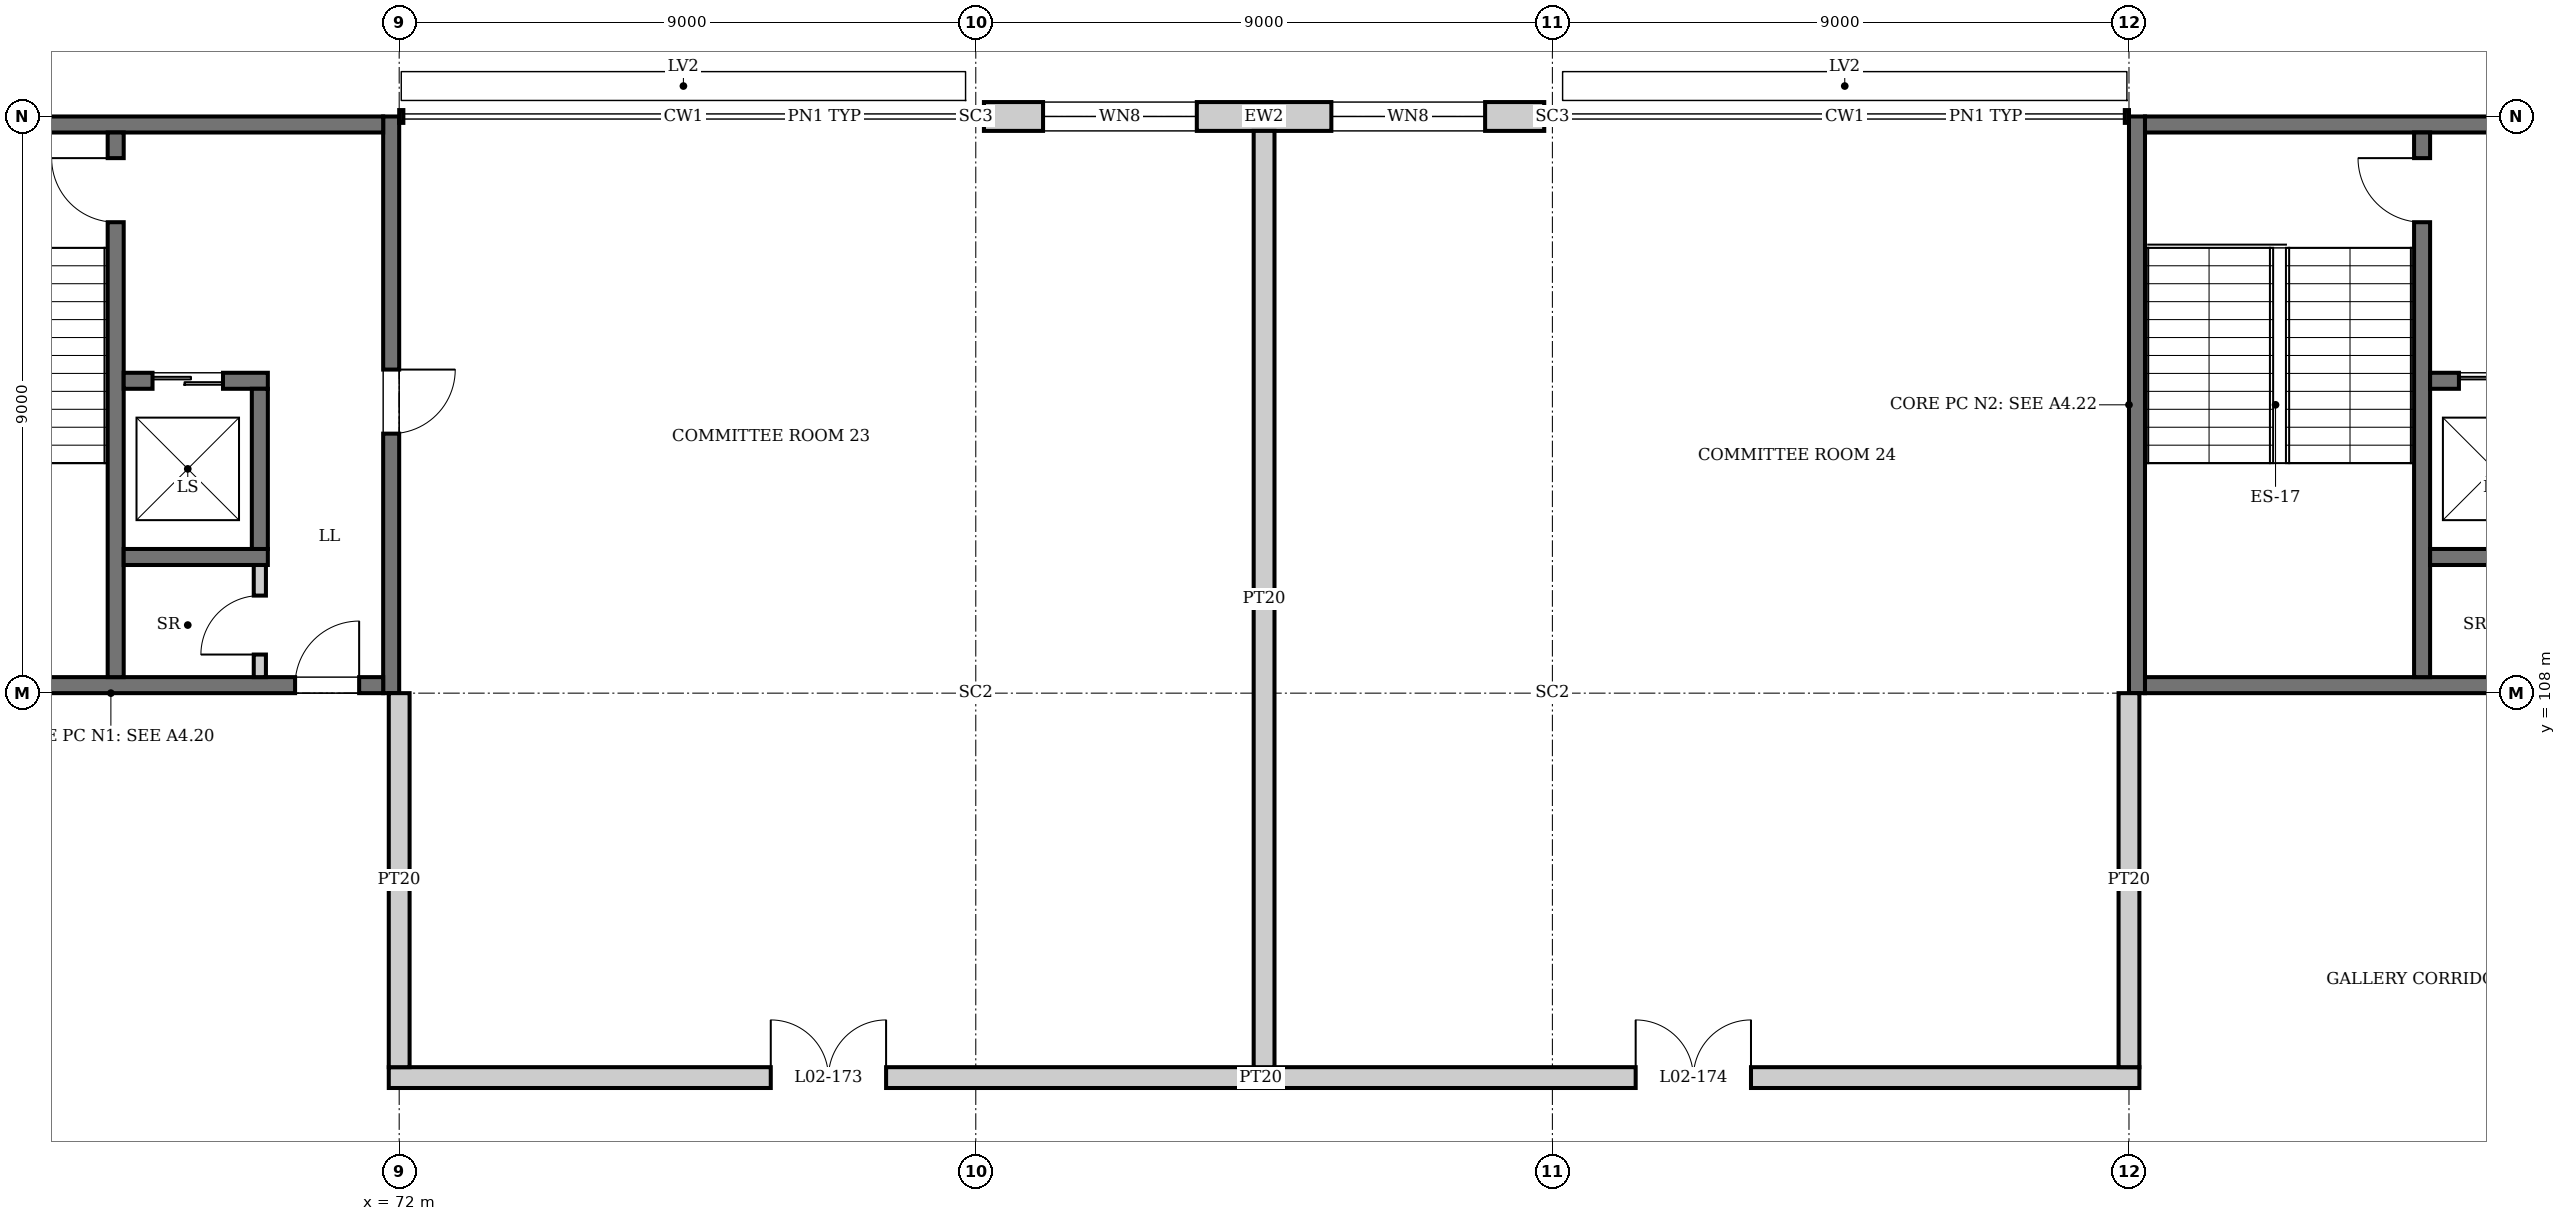
"""IFC4 building model, lengths in metres.
Left out: names, types, materials, properties, quantities, classifications, styles, units other than length and angle.
Written with IfcOpenShell. Run it as: python <this file> out.ifc"""

import sys

from ifc_helpers import new_model, si_unit, direction, frame, frame_2d, origin, origin_2d, place, context, subcontext, project, spatial, rectangle, i_section, extrude, element, fill, save


model = new_model("IFC4")
c1 = context("Model", 3, precision=1e-05, world=origin(), true_north=direction((0.0, 1.0)))
c2 = subcontext(c1, "Body", "Model", "MODEL_VIEW")
j1 = project(units=[si_unit("LENGTHUNIT", "METRE"), si_unit("PLANEANGLEUNIT", "RADIAN")], contexts=[c1])
p1 = place(None, origin())
s1 = spatial("IfcSite", under=j1, at=p1, CompositionType="ELEMENT")
p2 = place(p1, origin())
s2 = spatial("IfcBuilding", under=s1, at=p2, CompositionType="ELEMENT")
p3 = place(p2, frame((0.0, 0.0, 10.5)))
s3 = spatial("IfcBuildingStorey", under=s2, at=p3, CompositionType="ELEMENT", Elevation=10.5)
p4 = place(p3, frame((81.0, 108.0, 0.0), z_axis=(0.0, 0.0, 1.0), x_axis=(0.0, 1.0, 0.0)))
e1 = element("IfcColumn", 1, at=p4, inside=s3, PredefinedType="COLUMN", context=c2, shape_type="SweptSolid", body=[
    extrude(i_section(OverallWidth=0.256, OverallDepth=0.26, WebThickness=0.01, FlangeThickness=0.017, at=origin_2d()), origin(), (0.0, 0.0, 1.0), 4.5),
])
p5 = place(p3, frame((81.0, 117.0, 0.0), z_axis=(0.0, 0.0, 1.0), x_axis=(0.0, 1.0, 0.0)))
e2 = element("IfcColumn", 2, at=p5, inside=s3, PredefinedType="COLUMN", context=c2, shape_type="SweptSolid", body=[
    extrude(i_section(OverallWidth=0.254, OverallDepth=0.254, WebThickness=0.009, FlangeThickness=0.014, at=origin_2d()), origin(), (0.0, 0.0, 1.0), 4.5),
])
p6 = place(p3, frame((90.0, 108.0, 0.0), z_axis=(0.0, 0.0, 1.0), x_axis=(0.0, 1.0, 0.0)))
e3 = element("IfcColumn", 3, at=p6, inside=s3, PredefinedType="COLUMN", context=c2, shape_type="SweptSolid", body=[
    extrude(i_section(OverallWidth=0.256, OverallDepth=0.26, WebThickness=0.01, FlangeThickness=0.017, at=origin_2d()), origin(), (0.0, 0.0, 1.0), 4.5),
])
p7 = place(p3, frame((90.0, 117.0, 0.0), z_axis=(0.0, 0.0, 1.0), x_axis=(0.0, 1.0, 0.0)))
e4 = element("IfcColumn", 4, at=p7, inside=s3, PredefinedType="COLUMN", context=c2, shape_type="SweptSolid", body=[
    extrude(i_section(OverallWidth=0.254, OverallDepth=0.254, WebThickness=0.009, FlangeThickness=0.014, at=origin_2d()), origin(), (0.0, 0.0, 1.0), 4.5),
])
p8 = place(p3, frame((71.875, 108.0, 0.0), z_axis=(0.0, 0.0, 1.0), x_axis=(0.0, 1.0, 0.0)))
e5 = element("IfcWall", 5, at=p8, inside=s3, PredefinedType="SHEAR", context=c2, shape_type="SweptSolid", body=[
    extrude(rectangle(XDim=9.0, YDim=0.25, at=frame_2d((4.5, 0.0))), origin(), (0.0, 0.0, 1.0), 4.5),
])
p9 = place(p8, frame((4.05, 0.0, 0.0)))
e6 = element("IfcOpeningElement", 6, at=p9, cuts=e5, PredefinedType="OPENING", context=c2, shape_type="SweptSolid", body=[
    extrude(rectangle(XDim=1.0, YDim=2.1, at=frame_2d((0.5, 1.05))), frame((0.0, 0.135, 0.0), z_axis=(0.0, -1.0, 0.0), x_axis=(1.0, 0.0, 0.0)), (0.0, 0.0, 1.0), 0.27),
])
p10 = place(p3, frame((63.25, 108.125, 0.0), z_axis=(0.0, 0.0, 1.0), x_axis=(1.0, 0.0, 0.0)))
e7 = element("IfcWall", 7, at=p10, inside=s3, PredefinedType="SHEAR", context=c2, shape_type="SweptSolid", body=[
    extrude(rectangle(XDim=8.5, YDim=0.25, at=frame_2d((4.25, 0.0))), origin(), (0.0, 0.0, 1.0), 4.5),
])
p11 = place(p10, frame((7.125, 0.0, 0.0)))
e8 = element("IfcOpeningElement", 8, at=p11, cuts=e7, PredefinedType="OPENING", context=c2, shape_type="SweptSolid", body=[
    extrude(rectangle(XDim=1.0, YDim=2.1, at=frame_2d((0.5, 1.05))), frame((0.0, 0.135, 0.0), z_axis=(0.0, -1.0, 0.0), x_axis=(1.0, 0.0, 0.0)), (0.0, 0.0, 1.0), 0.27),
])
p12 = place(p3, frame((63.25, 116.875, 0.0), z_axis=(0.0, 0.0, 1.0), x_axis=(1.0, 0.0, 0.0)))
e9 = element("IfcWall", 9, at=p12, inside=s3, PredefinedType="SHEAR", context=c2, shape_type="SweptSolid", body=[
    extrude(rectangle(XDim=8.5, YDim=0.25, at=frame_2d((4.25, 0.0))), origin(), (0.0, 0.0, 1.0), 4.5),
])
p13 = place(p3, frame((99.125, 108.0, 0.0), z_axis=(0.0, 0.0, 1.0), x_axis=(0.0, 1.0, 0.0)))
e10 = element("IfcWall", 10, at=p13, inside=s3, PredefinedType="SHEAR", context=c2, shape_type="SweptSolid", body=[
    extrude(rectangle(XDim=9.0, YDim=0.25, at=frame_2d((4.5, 0.0))), origin(), (0.0, 0.0, 1.0), 4.5),
])
p14 = place(p3, frame((99.25, 108.125, 0.0), z_axis=(0.0, 0.0, 1.0), x_axis=(1.0, 0.0, 0.0)))
e11 = element("IfcWall", 11, at=p14, inside=s3, PredefinedType="SHEAR", context=c2, shape_type="SweptSolid", body=[
    extrude(rectangle(XDim=8.5, YDim=0.25, at=frame_2d((4.25, 0.0))), origin(), (0.0, 0.0, 1.0), 4.5),
])
p15 = place(p14, frame((7.125, 0.0, 0.0)))
e12 = element("IfcOpeningElement", 12, at=p15, cuts=e11, PredefinedType="OPENING", context=c2, shape_type="SweptSolid", body=[
    extrude(rectangle(XDim=1.0, YDim=2.1, at=frame_2d((0.5, 1.05))), frame((0.0, 0.135, 0.0), z_axis=(0.0, -1.0, 0.0), x_axis=(1.0, 0.0, 0.0)), (0.0, 0.0, 1.0), 0.27),
])
p16 = place(p3, frame((99.25, 116.875, 0.0), z_axis=(0.0, 0.0, 1.0), x_axis=(1.0, 0.0, 0.0)))
e13 = element("IfcWall", 13, at=p16, inside=s3, PredefinedType="SHEAR", context=c2, shape_type="SweptSolid", body=[
    extrude(rectangle(XDim=8.5, YDim=0.25, at=frame_2d((4.25, 0.0))), origin(), (0.0, 0.0, 1.0), 4.5),
])
p17 = place(p3, frame((81.127, 117.0, 0.0), z_axis=(0.0, 0.0, 1.0), x_axis=(1.0, 0.0, 0.0)))
e14 = element("IfcWall", 14, at=p17, inside=s3, PredefinedType="SOLIDWALL", context=c2, shape_type="SweptSolid", body=[
    extrude(rectangle(XDim=8.746, YDim=0.45, at=frame_2d((4.373, 0.0))), origin(), (0.0, 0.0, 1.0), 3.991),
])
p18 = place(p17, frame((0.923, 0.0, 0.9)))
e15 = element("IfcOpeningElement", 15, at=p18, cuts=e14, PredefinedType="OPENING", context=c2, shape_type="SweptSolid", body=[
    extrude(rectangle(XDim=2.4, YDim=2.1, at=frame_2d((1.2, 1.05))), frame((0.0, 0.235, 0.0), z_axis=(0.0, -1.0, 0.0), x_axis=(1.0, 0.0, 0.0)), (0.0, 0.0, 1.0), 0.47),
])
p19 = place(p17, frame((5.423, 0.0, 0.9)))
e16 = element("IfcOpeningElement", 16, at=p19, cuts=e14, PredefinedType="OPENING", context=c2, shape_type="SweptSolid", body=[
    extrude(rectangle(XDim=2.4, YDim=2.1, at=frame_2d((1.2, 1.05))), frame((0.0, 0.235, 0.0), z_axis=(0.0, -1.0, 0.0), x_axis=(1.0, 0.0, 0.0)), (0.0, 0.0, 1.0), 0.47),
])
p20 = place(p3, frame((67.575, 116.75, 0.0), z_axis=(0.0, 0.0, 1.0), x_axis=(0.0, -1.0, 0.0)))
e17 = element("IfcWall", 17, at=p20, inside=s3, PredefinedType="SOLIDWALL", context=c2, shape_type="SweptSolid", body=[
    extrude(rectangle(XDim=8.5, YDim=0.25, at=frame_2d((4.25, 0.0))), origin(), (0.0, 0.0, 1.0), 4.25),
])
p21 = place(p20, frame((0.4, 0.0, 0.0)))
e18 = element("IfcOpeningElement", 18, at=p21, cuts=e17, PredefinedType="OPENING", context=c2, shape_type="SweptSolid", body=[
    extrude(rectangle(XDim=1.0, YDim=2.1, at=frame_2d((0.5, 1.05))), frame((0.0, 0.135, 0.0), z_axis=(0.0, -1.0, 0.0), x_axis=(1.0, 0.0, 0.0)), (0.0, 0.0, 1.0), 0.27),
])
p22 = place(p3, frame((67.7, 110.125, 0.0), z_axis=(0.0, 0.0, 1.0), x_axis=(1.0, 0.0, 0.0)))
e19 = element("IfcWall", 19, at=p22, inside=s3, PredefinedType="SOLIDWALL", context=c2, shape_type="SweptSolid", body=[
    extrude(rectangle(XDim=2.25, YDim=0.25, at=frame_2d((1.125, 0.0))), origin(), (0.0, 0.0, 1.0), 4.5),
])
p23 = place(p3, frame((67.7, 112.875, 0.0), z_axis=(0.0, 0.0, 1.0), x_axis=(1.0, 0.0, 0.0)))
e20 = element("IfcWall", 20, at=p23, inside=s3, PredefinedType="SOLIDWALL", context=c2, shape_type="SweptSolid", body=[
    extrude(rectangle(XDim=2.25, YDim=0.25, at=frame_2d((1.125, 0.0))), origin(), (0.0, 0.0, 1.0), 4.5),
])
p24 = place(p23, frame((0.45, 0.0, 0.0)))
e21 = element("IfcOpeningElement", 21, at=p24, cuts=e20, PredefinedType="OPENING", context=c2, shape_type="SweptSolid", body=[
    extrude(rectangle(XDim=1.1, YDim=2.1, at=frame_2d((0.55, 1.05))), frame((0.0, 0.135, 0.0), z_axis=(0.0, -1.0, 0.0), x_axis=(1.0, 0.0, 0.0)), (0.0, 0.0, 1.0), 0.27),
])
p25 = place(p3, frame((69.825, 110.25, 0.0), z_axis=(0.0, 0.0, 1.0), x_axis=(0.0, 1.0, 0.0)))
e22 = element("IfcWall", 22, at=p25, inside=s3, PredefinedType="SOLIDWALL", context=c2, shape_type="SweptSolid", body=[
    extrude(rectangle(XDim=2.5, YDim=0.25, at=frame_2d((1.25, 0.0))), origin(), (0.0, 0.0, 1.0), 4.5),
])
p26 = place(p3, frame((103.575, 116.75, 0.0), z_axis=(0.0, 0.0, 1.0), x_axis=(0.0, -1.0, 0.0)))
e23 = element("IfcWall", 23, at=p26, inside=s3, PredefinedType="SOLIDWALL", context=c2, shape_type="SweptSolid", body=[
    extrude(rectangle(XDim=8.5, YDim=0.25, at=frame_2d((4.25, 0.0))), origin(), (0.0, 0.0, 1.0), 4.25),
])
p27 = place(p26, frame((0.4, 0.0, 0.0)))
e24 = element("IfcOpeningElement", 24, at=p27, cuts=e23, PredefinedType="OPENING", context=c2, shape_type="SweptSolid", body=[
    extrude(rectangle(XDim=1.0, YDim=2.1, at=frame_2d((0.5, 1.05))), frame((0.0, 0.135, 0.0), z_axis=(0.0, -1.0, 0.0), x_axis=(1.0, 0.0, 0.0)), (0.0, 0.0, 1.0), 0.27),
])
p28 = place(p3, frame((103.7, 110.125, 0.0), z_axis=(0.0, 0.0, 1.0), x_axis=(1.0, 0.0, 0.0)))
e25 = element("IfcWall", 25, at=p28, inside=s3, PredefinedType="SOLIDWALL", context=c2, shape_type="SweptSolid", body=[
    extrude(rectangle(XDim=2.25, YDim=0.25, at=frame_2d((1.125, 0.0))), origin(), (0.0, 0.0, 1.0), 4.5),
])
p29 = place(p3, frame((103.7, 112.875, 0.0), z_axis=(0.0, 0.0, 1.0), x_axis=(1.0, 0.0, 0.0)))
e26 = element("IfcWall", 26, at=p29, inside=s3, PredefinedType="SOLIDWALL", context=c2, shape_type="SweptSolid", body=[
    extrude(rectangle(XDim=2.25, YDim=0.25, at=frame_2d((1.125, 0.0))), origin(), (0.0, 0.0, 1.0), 4.5),
])
p30 = place(p29, frame((0.45, 0.0, 0.0)))
e27 = element("IfcOpeningElement", 27, at=p30, cuts=e26, PredefinedType="OPENING", context=c2, shape_type="SweptSolid", body=[
    extrude(rectangle(XDim=1.1, YDim=2.1, at=frame_2d((0.55, 1.05))), frame((0.0, 0.135, 0.0), z_axis=(0.0, -1.0, 0.0), x_axis=(1.0, 0.0, 0.0)), (0.0, 0.0, 1.0), 0.27),
])
p31 = place(p3, frame((71.837, 102.0, 0.0), z_axis=(0.0, 0.0, 1.0), x_axis=(1.0, 0.0, 0.0)))
e28 = element("IfcWall", 28, at=p31, inside=s3, PredefinedType="PARTITIONING", context=c2, shape_type="SweptSolid", body=[
    extrude(rectangle(XDim=27.325, YDim=0.325, at=frame_2d((13.663, 0.0))), origin(), (0.0, 0.0, 1.0), 3.998),
])
p32 = place(p31, frame((5.962, 0.0, 0.0)))
e29 = element("IfcOpeningElement", 29, at=p32, cuts=e28, PredefinedType="OPENING", context=c2, shape_type="SweptSolid", body=[
    extrude(rectangle(XDim=1.8, YDim=2.4, at=frame_2d((0.9, 1.2))), frame((0.0, 0.172, 0.0), z_axis=(0.0, -1.0, 0.0), x_axis=(1.0, 0.0, 0.0)), (0.0, 0.0, 1.0), 0.345),
])
p33 = place(p31, frame((19.462, 0.0, 0.0)))
e30 = element("IfcOpeningElement", 30, at=p33, cuts=e28, PredefinedType="OPENING", context=c2, shape_type="SweptSolid", body=[
    extrude(rectangle(XDim=1.8, YDim=2.4, at=frame_2d((0.9, 1.2))), frame((0.0, 0.172, 0.0), z_axis=(0.0, -1.0, 0.0), x_axis=(1.0, 0.0, 0.0)), (0.0, 0.0, 1.0), 0.345),
])
p34 = place(p3, frame((69.825, 108.25, 0.0), z_axis=(0.0, 0.0, 1.0), x_axis=(0.0, 1.0, 0.0)))
e31 = element("IfcWall", 31, at=p34, inside=s3, PredefinedType="PARTITIONING", context=c2, shape_type="SweptSolid", body=[
    extrude(rectangle(XDim=1.75, YDim=0.19, at=frame_2d((0.875, 0.0))), origin(), (0.0, 0.0, 1.0), 4.25),
])
p35 = place(p34, frame((0.353, 0.0, 0.0)))
e32 = element("IfcOpeningElement", 32, at=p35, cuts=e31, PredefinedType="OPENING", context=c2, shape_type="SweptSolid", body=[
    extrude(rectangle(XDim=0.92, YDim=2.1, at=frame_2d((0.46, 1.05))), frame((0.0, 0.105, 0.0), z_axis=(0.0, -1.0, 0.0), x_axis=(1.0, 0.0, 0.0)), (0.0, 0.0, 1.0), 0.21),
])
p36 = place(p3, frame((72.0, 102.163, 0.0), z_axis=(0.0, 0.0, 1.0), x_axis=(0.0, 1.0, 0.0)))
e33 = element("IfcWall", 33, at=p36, inside=s3, PredefinedType="PARTITIONING", context=c2, shape_type="SweptSolid", body=[
    extrude(rectangle(XDim=5.837, YDim=0.325, at=frame_2d((2.919, 0.0))), origin(), (0.0, 0.0, 1.0), 3.822),
])
p37 = place(p3, frame((85.5, 102.163, 0.0), z_axis=(0.0, 0.0, 1.0), x_axis=(0.0, 1.0, 0.0)))
e34 = element("IfcWall", 34, at=p37, inside=s3, PredefinedType="PARTITIONING", context=c2, shape_type="SweptSolid", body=[
    extrude(rectangle(XDim=14.612, YDim=0.325, at=frame_2d((7.306, 0.0))), origin(), (0.0, 0.0, 1.0), 3.822),
])
p38 = place(p3, frame((99.0, 102.163, 0.0), z_axis=(0.0, 0.0, 1.0), x_axis=(0.0, 1.0, 0.0)))
e35 = element("IfcWall", 35, at=p38, inside=s3, PredefinedType="PARTITIONING", context=c2, shape_type="SweptSolid", body=[
    extrude(rectangle(XDim=5.837, YDim=0.325, at=frame_2d((2.919, 0.0))), origin(), (0.0, 0.0, 1.0), 3.822),
])
p39 = place(p18, origin())
e36 = element("IfcWindow", 36, at=p39, inside=s3, PartitioningType="SINGLE_PANEL", PredefinedType="WINDOW", context=c2, shape_type="SweptSolid", body=[
    extrude(rectangle(XDim=2.4, YDim=2.1, at=frame_2d((1.2, 1.05))), frame((0.0, 0.03, 0.0), z_axis=(0.0, -1.0, 0.0), x_axis=(1.0, 0.0, 0.0)), (0.0, 0.0, 1.0), 0.06),
])
fill(e15, e36)
p40 = place(p19, origin())
e37 = element("IfcWindow", 37, at=p40, inside=s3, PartitioningType="SINGLE_PANEL", PredefinedType="WINDOW", context=c2, shape_type="SweptSolid", body=[
    extrude(rectangle(XDim=2.4, YDim=2.1, at=frame_2d((1.2, 1.05))), frame((0.0, 0.03, 0.0), z_axis=(0.0, -1.0, 0.0), x_axis=(1.0, 0.0, 0.0)), (0.0, 0.0, 1.0), 0.06),
])
fill(e16, e37)
p41 = place(p24, origin())
e38 = element("IfcDoor", 38, at=p41, inside=s3, OperationType="DOUBLE_DOOR_SLIDING", PredefinedType="DOOR", context=c2, shape_type="SweptSolid", body=[
    extrude(rectangle(XDim=1.1, YDim=2.1, at=frame_2d((0.55, 1.05))), frame((0.0, 0.025, 0.0), z_axis=(0.0, -1.0, 0.0), x_axis=(1.0, 0.0, 0.0)), (0.0, 0.0, 1.0), 0.05),
])
fill(e21, e38)
p42 = place(p30, origin())
e39 = element("IfcDoor", 39, at=p42, inside=s3, OperationType="DOUBLE_DOOR_SLIDING", PredefinedType="DOOR", context=c2, shape_type="SweptSolid", body=[
    extrude(rectangle(XDim=1.1, YDim=2.1, at=frame_2d((0.55, 1.05))), frame((0.0, 0.025, 0.0), z_axis=(0.0, -1.0, 0.0), x_axis=(1.0, 0.0, 0.0)), (0.0, 0.0, 1.0), 0.05),
])
fill(e27, e39)
p43 = place(p21, frame((1.0, 0.0, 0.0), z_axis=(0.0, 0.0, 1.0), x_axis=(-1.0, 0.0, 0.0)))
e40 = element("IfcDoor", 40, at=p43, inside=s3, OperationType="SINGLE_SWING_RIGHT", PredefinedType="DOOR", context=c2, shape_type="SweptSolid", body=[
    extrude(rectangle(XDim=1.0, YDim=2.1, at=frame_2d((0.5, 1.05))), frame((0.0, 0.025, 0.0), z_axis=(0.0, -1.0, 0.0), x_axis=(1.0, 0.0, 0.0)), (0.0, 0.0, 1.0), 0.05),
])
fill(e18, e40)
p44 = place(p35, origin())
e41 = element("IfcDoor", 41, at=p44, inside=s3, OperationType="SINGLE_SWING_LEFT", PredefinedType="DOOR", context=c2, shape_type="SweptSolid", body=[
    extrude(rectangle(XDim=0.92, YDim=2.1, at=frame_2d((0.46, 1.05))), frame((0.0, 0.025, 0.0), z_axis=(0.0, -1.0, 0.0), x_axis=(1.0, 0.0, 0.0)), (0.0, 0.0, 1.0), 0.05),
])
fill(e32, e41)
p45 = place(p27, frame((1.0, 0.0, 0.0), z_axis=(0.0, 0.0, 1.0), x_axis=(-1.0, 0.0, 0.0)))
e42 = element("IfcDoor", 42, at=p45, inside=s3, OperationType="SINGLE_SWING_RIGHT", PredefinedType="DOOR", context=c2, shape_type="SweptSolid", body=[
    extrude(rectangle(XDim=1.0, YDim=2.1, at=frame_2d((0.5, 1.05))), frame((0.0, 0.025, 0.0), z_axis=(0.0, -1.0, 0.0), x_axis=(1.0, 0.0, 0.0)), (0.0, 0.0, 1.0), 0.05),
])
fill(e24, e42)
p46 = place(p11, origin())
e43 = element("IfcDoor", 43, at=p46, inside=s3, OperationType="SINGLE_SWING_RIGHT", PredefinedType="DOOR", context=c2, shape_type="SweptSolid", body=[
    extrude(rectangle(XDim=1.0, YDim=2.1, at=frame_2d((0.5, 1.05))), frame((0.0, 0.025, 0.0), z_axis=(0.0, -1.0, 0.0), x_axis=(1.0, 0.0, 0.0)), (0.0, 0.0, 1.0), 0.05),
])
fill(e8, e43)
p47 = place(p9, frame((1.0, 0.0, 0.0), z_axis=(0.0, 0.0, 1.0), x_axis=(-1.0, 0.0, 0.0)))
e44 = element("IfcDoor", 44, at=p47, inside=s3, OperationType="SINGLE_SWING_LEFT", PredefinedType="DOOR", context=c2, shape_type="SweptSolid", body=[
    extrude(rectangle(XDim=1.0, YDim=2.1, at=frame_2d((0.5, 1.05))), frame((0.0, 0.025, 0.0), z_axis=(0.0, -1.0, 0.0), x_axis=(1.0, 0.0, 0.0)), (0.0, 0.0, 1.0), 0.05),
])
fill(e6, e44)
p48 = place(p32, origin())
e45 = element("IfcDoor", 45, at=p48, inside=s3, OperationType="DOUBLE_DOOR_SINGLE_SWING", PredefinedType="DOOR", context=c2, shape_type="SweptSolid", body=[
    extrude(rectangle(XDim=1.8, YDim=2.4, at=frame_2d((0.9, 1.2))), frame((0.0, 0.025, 0.0), z_axis=(0.0, -1.0, 0.0), x_axis=(1.0, 0.0, 0.0)), (0.0, 0.0, 1.0), 0.05),
])
fill(e29, e45)
p49 = place(p33, origin())
e46 = element("IfcDoor", 46, at=p49, inside=s3, OperationType="DOUBLE_DOOR_SINGLE_SWING", PredefinedType="DOOR", context=c2, shape_type="SweptSolid", body=[
    extrude(rectangle(XDim=1.8, YDim=2.4, at=frame_2d((0.9, 1.2))), frame((0.0, 0.025, 0.0), z_axis=(0.0, -1.0, 0.0), x_axis=(1.0, 0.0, 0.0)), (0.0, 0.0, 1.0), 0.05),
])
fill(e30, e46)
save(model, sys.argv[1])
